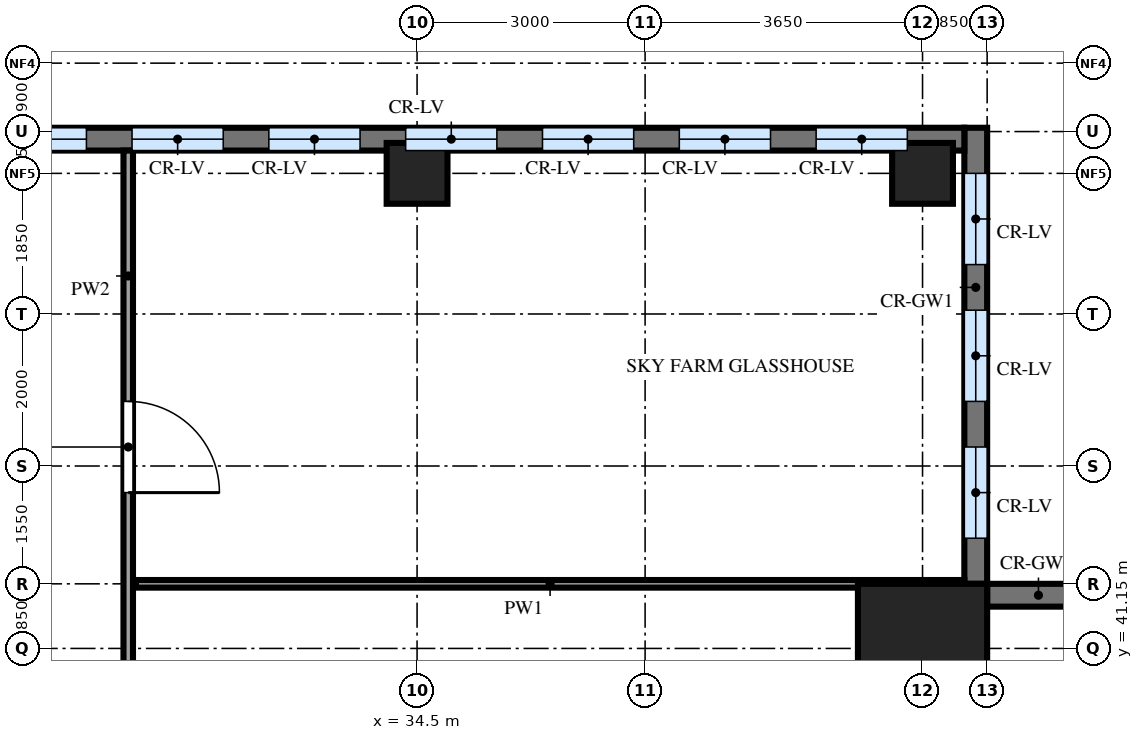
"""IFC4 building model, lengths in metres.
Left out: names, types, materials, properties, quantities, classifications, styles, units other than length and angle.
Written with IfcOpenShell. Run it as: python <this file> out.ifc"""

import sys

from ifc_helpers import new_model, si_unit, direction, frame, frame_2d, origin, origin_2d, place, context, subcontext, project, spatial, rectangle, extrude, source, transform, mapped, element, fill, save


model = new_model("IFC4")
c1 = context("Model", 3, precision=1e-05, world=origin(), true_north=direction((0.0, 1.0)))
c2 = subcontext(c1, "Body", "Model", "MODEL_VIEW")
j1 = project(units=[si_unit("LENGTHUNIT", "METRE"), si_unit("PLANEANGLEUNIT", "RADIAN")], contexts=[c1])
p1 = place(None, origin())
s1 = spatial("IfcSite", under=j1, at=p1, CompositionType="ELEMENT")
p2 = place(p1, origin())
s2 = spatial("IfcBuilding", under=s1, at=p2, CompositionType="ELEMENT")
p3 = place(p2, frame((0.0, 0.0, 330.2)))
s3 = spatial("IfcBuildingStorey", under=s2, at=p3, CompositionType="ELEMENT", Elevation=330.2)
m1 = source(origin(), c2, "Body", "SweptSolid", [
    extrude(rectangle(XDim=1.7, YDim=1.7, at=origin_2d()), origin(), (0.0, 0.0, 1.0), 4.5),
])
p4 = place(p3, frame((41.15, 41.15, 0.0), z_axis=(0.0, 0.0, 1.0), x_axis=(1.0, 0.0, 0.0)))
e1 = element("IfcColumn", 1, at=p4, inside=s3, PredefinedType="COLUMN", context=c2, shape_type="MappedRepresentation", body=[
    mapped(m1, transform((0.0, 0.0, 0.0))),
])
m2 = source(origin(), c2, "Body", "SweptSolid", [
    extrude(rectangle(XDim=0.8, YDim=0.8, at=origin_2d()), origin(), (0.0, 0.0, 1.0), 4.5),
])
for number, where, z_axis, x_axis in (
    (2, (34.5, 47.4, 0.0), (0.0, 0.0, 1.0), (1.0, 0.0, 0.0)),
    (3, (41.15, 47.4, 0.0), (0.0, 0.0, 1.0), (1.0, 0.0, 0.0)),
):
    element("IfcColumn", number, at=place(p3, frame(where, z_axis=z_axis, x_axis=x_axis)), inside=s3, PredefinedType="COLUMN", context=c2, shape_type="MappedRepresentation", body=[
        mapped(m2, transform((0.0, 0.0, 0.0))),
    ])
m3 = source(origin(), c2, "Body", "SweptSolid", [
    extrude(rectangle(XDim=5.7, YDim=0.3, at=frame_2d((2.85, 0.0))), origin(), (0.0, 0.0, 1.0), 4.5),
])
p5 = place(p3, frame((47.7, 41.85, 0.0), z_axis=(0.0, 0.0, 1.0), x_axis=(-1.0, 0.0, 0.0)))
e4 = element("IfcWall", 4, at=p5, inside=s3, PredefinedType="SOLIDWALL", context=c2, shape_type="MappedRepresentation", body=[
    mapped(m3, transform((0.0, 0.0, 0.0))),
])
m4 = source(origin(), c2, "Body", "SweptSolid", [
    extrude(rectangle(XDim=1.2, YDim=2.4, at=frame_2d((0.6, 1.2))), frame((0.0, 0.16, 0.0), z_axis=(0.0, -1.0, 0.0), x_axis=(1.0, 0.0, 0.0)), (0.0, 0.0, 1.0), 0.32),
])
p6 = place(p5, frame((1.35, 0.0, 0.9)))
e5 = element("IfcOpeningElement", 5, at=p6, cuts=e4, PredefinedType="OPENING", context=c2, shape_type="MappedRepresentation", body=[
    mapped(m4, transform((0.0, 0.0, 0.0))),
])
p7 = place(p5, frame((3.15, 0.0, 0.9)))
e6 = element("IfcOpeningElement", 6, at=p7, cuts=e4, PredefinedType="OPENING", context=c2, shape_type="MappedRepresentation", body=[
    mapped(m4, transform((0.0, 0.0, 0.0))),
])
m5 = source(origin(), c2, "Body", "SweptSolid", [
    extrude(rectangle(XDim=6.0, YDim=0.3, at=frame_2d((3.0, 0.0))), origin(), (0.0, 0.0, 1.0), 4.5),
])
p8 = place(p3, frame((41.85, 42.0, 0.0), z_axis=(0.0, 0.0, 1.0), x_axis=(0.0, 1.0, 0.0)))
e7 = element("IfcWall", 7, at=p8, inside=s3, PredefinedType="SOLIDWALL", context=c2, shape_type="MappedRepresentation", body=[
    mapped(m5, transform((0.0, 0.0, 0.0))),
])
p9 = place(p8, frame((0.6, 0.0, 0.9)))
e8 = element("IfcOpeningElement", 8, at=p9, cuts=e7, PredefinedType="OPENING", context=c2, shape_type="MappedRepresentation", body=[
    mapped(m4, transform((0.0, 0.0, 0.0))),
])
p10 = place(p8, frame((2.4, 0.0, 0.9)))
e9 = element("IfcOpeningElement", 9, at=p10, cuts=e7, PredefinedType="OPENING", context=c2, shape_type="MappedRepresentation", body=[
    mapped(m4, transform((0.0, 0.0, 0.0))),
])
p11 = place(p8, frame((4.2, 0.0, 0.9)))
e10 = element("IfcOpeningElement", 10, at=p11, cuts=e7, PredefinedType="OPENING", context=c2, shape_type="MappedRepresentation", body=[
    mapped(m4, transform((0.0, 0.0, 0.0))),
])
m6 = source(origin(), c2, "Body", "SweptSolid", [
    extrude(rectangle(XDim=29.7, YDim=0.3, at=frame_2d((14.85, 0.0))), origin(), (0.0, 0.0, 1.0), 4.5),
])
p12 = place(p3, frame((41.7, 47.85, 0.0), z_axis=(0.0, 0.0, 1.0), x_axis=(-1.0, 0.0, 0.0)))
e11 = element("IfcWall", 11, at=p12, inside=s3, PredefinedType="SOLIDWALL", context=c2, shape_type="MappedRepresentation", body=[
    mapped(m6, transform((0.0, 0.0, 0.0))),
])
p13 = place(p12, frame((0.75, 0.0, 0.9)))
e12 = element("IfcOpeningElement", 12, at=p13, cuts=e11, PredefinedType="OPENING", context=c2, shape_type="MappedRepresentation", body=[
    mapped(m4, transform((0.0, 0.0, 0.0))),
])
p14 = place(p12, frame((2.55, 0.0, 0.9)))
e13 = element("IfcOpeningElement", 13, at=p14, cuts=e11, PredefinedType="OPENING", context=c2, shape_type="MappedRepresentation", body=[
    mapped(m4, transform((0.0, 0.0, 0.0))),
])
p15 = place(p12, frame((4.35, 0.0, 0.9)))
e14 = element("IfcOpeningElement", 14, at=p15, cuts=e11, PredefinedType="OPENING", context=c2, shape_type="MappedRepresentation", body=[
    mapped(m4, transform((0.0, 0.0, 0.0))),
])
p16 = place(p12, frame((6.15, 0.0, 0.9)))
e15 = element("IfcOpeningElement", 15, at=p16, cuts=e11, PredefinedType="OPENING", context=c2, shape_type="MappedRepresentation", body=[
    mapped(m4, transform((0.0, 0.0, 0.0))),
])
p17 = place(p12, frame((7.95, 0.0, 0.9)))
e16 = element("IfcOpeningElement", 16, at=p17, cuts=e11, PredefinedType="OPENING", context=c2, shape_type="MappedRepresentation", body=[
    mapped(m4, transform((0.0, 0.0, 0.0))),
])
p18 = place(p12, frame((9.75, 0.0, 0.9)))
e17 = element("IfcOpeningElement", 17, at=p18, cuts=e11, PredefinedType="OPENING", context=c2, shape_type="MappedRepresentation", body=[
    mapped(m4, transform((0.0, 0.0, 0.0))),
])
p19 = place(p12, frame((11.55, 0.0, 0.9)))
e18 = element("IfcOpeningElement", 18, at=p19, cuts=e11, PredefinedType="OPENING", context=c2, shape_type="MappedRepresentation", body=[
    mapped(m4, transform((0.0, 0.0, 0.0))),
])
p20 = place(p12, frame((13.35, 0.0, 0.9)))
e19 = element("IfcOpeningElement", 19, at=p20, cuts=e11, PredefinedType="OPENING", context=c2, shape_type="MappedRepresentation", body=[
    mapped(m4, transform((0.0, 0.0, 0.0))),
])
p21 = place(p12, frame((15.15, 0.0, 0.9)))
e20 = element("IfcOpeningElement", 20, at=p21, cuts=e11, PredefinedType="OPENING", context=c2, shape_type="MappedRepresentation", body=[
    mapped(m4, transform((0.0, 0.0, 0.0))),
])
p22 = place(p12, frame((16.95, 0.0, 0.9)))
e21 = element("IfcOpeningElement", 21, at=p22, cuts=e11, PredefinedType="OPENING", context=c2, shape_type="MappedRepresentation", body=[
    mapped(m4, transform((0.0, 0.0, 0.0))),
])
p23 = place(p12, frame((18.75, 0.0, 0.9)))
e22 = element("IfcOpeningElement", 22, at=p23, cuts=e11, PredefinedType="OPENING", context=c2, shape_type="MappedRepresentation", body=[
    mapped(m4, transform((0.0, 0.0, 0.0))),
])
p24 = place(p12, frame((20.55, 0.0, 0.9)))
e23 = element("IfcOpeningElement", 23, at=p24, cuts=e11, PredefinedType="OPENING", context=c2, shape_type="MappedRepresentation", body=[
    mapped(m4, transform((0.0, 0.0, 0.0))),
])
p25 = place(p12, frame((22.35, 0.0, 0.9)))
e24 = element("IfcOpeningElement", 24, at=p25, cuts=e11, PredefinedType="OPENING", context=c2, shape_type="MappedRepresentation", body=[
    mapped(m4, transform((0.0, 0.0, 0.0))),
])
p26 = place(p12, frame((24.15, 0.0, 0.9)))
e25 = element("IfcOpeningElement", 25, at=p26, cuts=e11, PredefinedType="OPENING", context=c2, shape_type="MappedRepresentation", body=[
    mapped(m4, transform((0.0, 0.0, 0.0))),
])
p27 = place(p12, frame((25.95, 0.0, 0.9)))
e26 = element("IfcOpeningElement", 26, at=p27, cuts=e11, PredefinedType="OPENING", context=c2, shape_type="MappedRepresentation", body=[
    mapped(m4, transform((0.0, 0.0, 0.0))),
])
p28 = place(p12, frame((27.75, 0.0, 0.9)))
e27 = element("IfcOpeningElement", 27, at=p28, cuts=e11, PredefinedType="OPENING", context=c2, shape_type="MappedRepresentation", body=[
    mapped(m4, transform((0.0, 0.0, 0.0))),
])
m7 = source(origin(), c2, "Body", "SweptSolid", [
    extrude(rectangle(XDim=8.6, YDim=0.125, at=frame_2d((4.3, 0.0))), origin(), (0.0, 0.0, 1.0), 4.3),
])
p29 = place(p3, frame((30.7, 39.1, 0.0), z_axis=(0.0, 0.0, 1.0), x_axis=(0.0, 1.0, 0.0)))
e28 = element("IfcWall", 28, at=p29, inside=s3, PredefinedType="PARTITIONING", context=c2, shape_type="MappedRepresentation", body=[
    mapped(m7, transform((0.0, 0.0, 0.0))),
])
m8 = source(origin(), c2, "Body", "SweptSolid", [
    extrude(rectangle(XDim=0.9, YDim=2.1, at=frame_2d((0.45, 1.05))), frame((0.0, 0.073, 0.0), z_axis=(0.0, -1.0, 0.0), x_axis=(1.0, 0.0, 0.0)), (0.0, 0.0, 1.0), 0.145),
])
p30 = place(p29, frame((0.8, 0.0, 0.0)))
e29 = element("IfcOpeningElement", 29, at=p30, cuts=e28, PredefinedType="OPENING", context=c2, shape_type="MappedRepresentation", body=[
    mapped(m8, transform((0.0, 0.0, 0.0))),
])
m9 = source(origin(), c2, "Body", "SweptSolid", [
    extrude(rectangle(XDim=1.2, YDim=2.1, at=frame_2d((0.6, 1.05))), frame((0.0, 0.073, 0.0), z_axis=(0.0, -1.0, 0.0), x_axis=(1.0, 0.0, 0.0)), (0.0, 0.0, 1.0), 0.145),
])
p31 = place(p29, frame((4.1, 0.0, 0.0)))
e30 = element("IfcOpeningElement", 30, at=p31, cuts=e28, PredefinedType="OPENING", context=c2, shape_type="MappedRepresentation", body=[
    mapped(m9, transform((0.0, 0.0, 0.0))),
])
m10 = source(origin(), c2, "Body", "SweptSolid", [
    extrude(rectangle(XDim=10.9, YDim=0.1, at=frame_2d((5.45, 0.0))), origin(), (0.0, 0.0, 1.0), 4.3),
])
p32 = place(p3, frame((30.8, 42.0, 0.0), z_axis=(0.0, 0.0, 1.0), x_axis=(1.0, 0.0, 0.0)))
e31 = element("IfcWall", 31, at=p32, inside=s3, PredefinedType="PARTITIONING", context=c2, shape_type="MappedRepresentation", body=[
    mapped(m10, transform((0.0, 0.0, 0.0))),
])
m11 = source(origin(), c2, "Body", "SweptSolid", [
    extrude(rectangle(XDim=1.2, YDim=2.4, at=frame_2d((0.6, 1.2))), frame((0.0, 0.03, 0.0), z_axis=(0.0, -1.0, 0.0), x_axis=(1.0, 0.0, 0.0)), (0.0, 0.0, 1.0), 0.06),
])
p33 = place(p9, origin())
e32 = element("IfcWindow", 32, at=p33, inside=s3, PartitioningType="SINGLE_PANEL", PredefinedType="WINDOW", context=c2, shape_type="MappedRepresentation", body=[
    mapped(m11, transform((0.0, 0.0, 0.0))),
])
fill(e8, e32)
p34 = place(p10, origin())
e33 = element("IfcWindow", 33, at=p34, inside=s3, PartitioningType="SINGLE_PANEL", PredefinedType="WINDOW", context=c2, shape_type="MappedRepresentation", body=[
    mapped(m11, transform((0.0, 0.0, 0.0))),
])
fill(e9, e33)
p35 = place(p11, origin())
e34 = element("IfcWindow", 34, at=p35, inside=s3, PartitioningType="SINGLE_PANEL", PredefinedType="WINDOW", context=c2, shape_type="MappedRepresentation", body=[
    mapped(m11, transform((0.0, 0.0, 0.0))),
])
fill(e10, e34)
p36 = place(p13, origin())
e35 = element("IfcWindow", 35, at=p36, inside=s3, PartitioningType="SINGLE_PANEL", PredefinedType="WINDOW", context=c2, shape_type="MappedRepresentation", body=[
    mapped(m11, transform((0.0, 0.0, 0.0))),
])
fill(e12, e35)
p37 = place(p14, origin())
e36 = element("IfcWindow", 36, at=p37, inside=s3, PartitioningType="SINGLE_PANEL", PredefinedType="WINDOW", context=c2, shape_type="MappedRepresentation", body=[
    mapped(m11, transform((0.0, 0.0, 0.0))),
])
fill(e13, e36)
p38 = place(p15, origin())
e37 = element("IfcWindow", 37, at=p38, inside=s3, PartitioningType="SINGLE_PANEL", PredefinedType="WINDOW", context=c2, shape_type="MappedRepresentation", body=[
    mapped(m11, transform((0.0, 0.0, 0.0))),
])
fill(e14, e37)
p39 = place(p16, origin())
e38 = element("IfcWindow", 38, at=p39, inside=s3, PartitioningType="SINGLE_PANEL", PredefinedType="WINDOW", context=c2, shape_type="MappedRepresentation", body=[
    mapped(m11, transform((0.0, 0.0, 0.0))),
])
fill(e15, e38)
p40 = place(p17, origin())
e39 = element("IfcWindow", 39, at=p40, inside=s3, PartitioningType="SINGLE_PANEL", PredefinedType="WINDOW", context=c2, shape_type="MappedRepresentation", body=[
    mapped(m11, transform((0.0, 0.0, 0.0))),
])
fill(e16, e39)
p41 = place(p18, origin())
e40 = element("IfcWindow", 40, at=p41, inside=s3, PartitioningType="SINGLE_PANEL", PredefinedType="WINDOW", context=c2, shape_type="MappedRepresentation", body=[
    mapped(m11, transform((0.0, 0.0, 0.0))),
])
fill(e17, e40)
p42 = place(p19, origin())
e41 = element("IfcWindow", 41, at=p42, inside=s3, PartitioningType="SINGLE_PANEL", PredefinedType="WINDOW", context=c2, shape_type="MappedRepresentation", body=[
    mapped(m11, transform((0.0, 0.0, 0.0))),
])
fill(e18, e41)
m12 = source(origin(), c2, "Body", "SweptSolid", [
    extrude(rectangle(XDim=1.2, YDim=2.1, at=frame_2d((0.6, 1.05))), frame((0.0, 0.025, 0.0), z_axis=(0.0, -1.0, 0.0), x_axis=(1.0, 0.0, 0.0)), (0.0, 0.0, 1.0), 0.05),
])
p43 = place(p31, origin())
e42 = element("IfcDoor", 42, at=p43, inside=s3, OperationType="SINGLE_SWING_LEFT", PredefinedType="DOOR", context=c2, shape_type="MappedRepresentation", body=[
    mapped(m12, transform((0.0, 0.0, 0.0))),
])
fill(e30, e42)
save(model, sys.argv[1])
